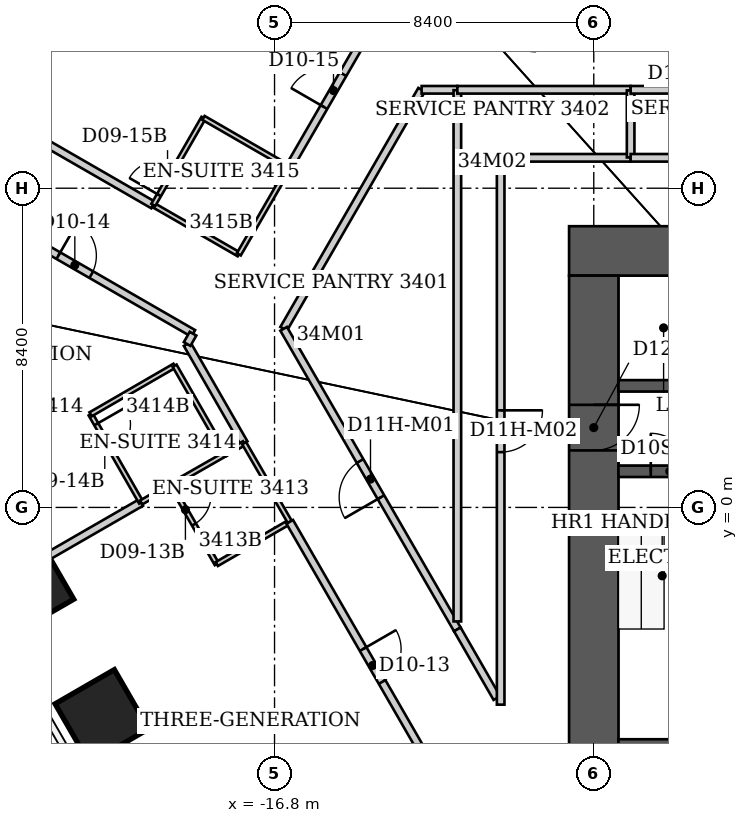
"""IFC4 building model, lengths in metres.
Left out: names, types, materials, properties, quantities, classifications, styles, units other than length and angle.
Written with IfcOpenShell. Run it as: python <this file> out.ifc"""

import sys

from ifc_helpers import new_model, si_unit, direction, frame, frame_2d, origin, origin_2d, place, context, subcontext, project, spatial, rectangle, extrude, element, fill, save


model = new_model("IFC4")
c1 = context("Model", 3, precision=1e-05, world=origin(), true_north=direction((0.0, 1.0)))
c2 = subcontext(c1, "Body", "Model", "MODEL_VIEW")
j1 = project(units=[si_unit("LENGTHUNIT", "METRE"), si_unit("PLANEANGLEUNIT", "RADIAN")], contexts=[c1])
p1 = place(None, origin())
s1 = spatial("IfcSite", under=j1, at=p1, CompositionType="ELEMENT")
p2 = place(p1, origin())
s2 = spatial("IfcBuilding", under=s1, at=p2, CompositionType="ELEMENT")
p3 = place(p2, frame((0.0, 0.0, 138.6)))
s3 = spatial("IfcBuildingStorey", under=s2, at=p3, CompositionType="ELEMENT", Elevation=138.6)
for number, where, z_axis, x_axis in (
    (1, (-21.344, -5.499, 0.0), (0.0, 0.0, 1.0), (-0.866, -0.5, 0.0)),
    (2, (-23.314, -2.087, 0.0), (0.0, 0.0, 1.0), (-0.866, -0.5, 0.0)),
):
    element("IfcColumn", number, at=place(p3, frame(where, z_axis=z_axis, x_axis=x_axis)), inside=s3, PredefinedType="COLUMN", context=c2, shape_type="SweptSolid", body=[
        extrude(rectangle(XDim=1.8, YDim=1.8, at=origin_2d()), origin(), (0.0, 0.0, 1.0), 3.8),
    ])
p4 = place(p3, frame((-9.05, 6.75, 0.0), z_axis=(0.0, 0.0, 1.0), x_axis=(1.0, 0.0, 0.0)))
e3 = element("IfcWall", 3, at=p4, inside=s3, PredefinedType="SHEAR", context=c2, shape_type="SweptSolid", body=[
    extrude(rectangle(XDim=18.1, YDim=1.3, at=frame_2d((9.05, 0.0))), origin(), (0.0, 0.0, 1.0), 3.8),
])
p5 = place(p3, frame((-8.4, -9.2, 0.0), z_axis=(0.0, 0.0, 1.0), x_axis=(0.0, 1.0, 0.0)))
e4 = element("IfcWall", 4, at=p5, inside=s3, PredefinedType="SHEAR", context=c2, shape_type="SweptSolid", body=[
    extrude(rectangle(XDim=15.3, YDim=1.3, at=frame_2d((7.65, 0.0))), origin(), (0.0, 0.0, 1.0), 3.8),
])
p6 = place(p5, frame((10.7, 0.0, 0.0)))
e5 = element("IfcOpeningElement", 5, at=p6, cuts=e4, PredefinedType="OPENING", context=c2, shape_type="SweptSolid", body=[
    extrude(rectangle(XDim=1.2, YDim=2.2, at=frame_2d((0.6, 1.1))), frame((0.0, 0.65, 0.0), z_axis=(0.0, -1.0, 0.0), x_axis=(1.0, 0.0, 0.0)), (0.0, 0.0, 1.0), 1.3),
])
p7 = place(p3, frame((-7.75, -6.5, 0.0), z_axis=(0.0, 0.0, 1.0), x_axis=(1.0, 0.0, 0.0)))
e6 = element("IfcWall", 6, at=p7, inside=s3, PredefinedType="SHEAR", context=c2, shape_type="SweptSolid", body=[
    extrude(rectangle(XDim=15.5, YDim=0.8, at=frame_2d((7.75, 0.0))), origin(), (0.0, 0.0, 1.0), 3.8),
])
p8 = place(p3, frame((-7.75, 0.95, 0.0), z_axis=(0.0, 0.0, 1.0), x_axis=(1.0, 0.0, 0.0)))
e7 = element("IfcWall", 7, at=p8, inside=s3, PredefinedType="SHEAR", context=c2, shape_type="SweptSolid", body=[
    extrude(rectangle(XDim=3.0, YDim=0.3, at=frame_2d((1.5, 0.0))), origin(), (0.0, 0.0, 1.0), 3.8),
])
p9 = place(p8, frame((0.85, 0.0, 0.0)))
e8 = element("IfcOpeningElement", 8, at=p9, cuts=e7, PredefinedType="OPENING", context=c2, shape_type="SweptSolid", body=[
    extrude(rectangle(XDim=1.0, YDim=2.2, at=frame_2d((0.5, 1.1))), frame((0.0, 0.15, 0.0), z_axis=(0.0, -1.0, 0.0), x_axis=(1.0, 0.0, 0.0)), (0.0, 0.0, 1.0), 0.3),
])
p10 = place(p3, frame((-7.75, 3.2, 0.0), z_axis=(0.0, 0.0, 1.0), x_axis=(1.0, 0.0, 0.0)))
e9 = element("IfcWall", 9, at=p10, inside=s3, PredefinedType="SHEAR", context=c2, shape_type="SweptSolid", body=[
    extrude(rectangle(XDim=15.5, YDim=0.3, at=frame_2d((7.75, 0.0))), origin(), (0.0, 0.0, 1.0), 3.8),
])
p11 = place(p10, frame((6.188, 0.0, 0.0)))
e10 = element("IfcOpeningElement", 10, at=p11, cuts=e9, PredefinedType="OPENING", context=c2, shape_type="SweptSolid", body=[
    extrude(rectangle(XDim=1.1, YDim=2.2, at=frame_2d((0.55, 1.1))), frame((0.0, 0.15, 0.0), z_axis=(0.0, -1.0, 0.0), x_axis=(1.0, 0.0, 0.0)), (0.0, 0.0, 1.0), 0.3),
])
p12 = place(p10, frame((10.075, 0.0, 0.0)))
e11 = element("IfcOpeningElement", 11, at=p12, cuts=e9, PredefinedType="OPENING", context=c2, shape_type="SweptSolid", body=[
    extrude(rectangle(XDim=1.1, YDim=2.2, at=frame_2d((0.55, 1.1))), frame((0.0, 0.15, 0.0), z_axis=(0.0, -1.0, 0.0), x_axis=(1.0, 0.0, 0.0)), (0.0, 0.0, 1.0), 0.3),
])
p13 = place(p10, frame((13.762, 0.0, 0.0)))
e12 = element("IfcOpeningElement", 12, at=p13, cuts=e9, PredefinedType="OPENING", context=c2, shape_type="SweptSolid", body=[
    extrude(rectangle(XDim=1.1, YDim=2.2, at=frame_2d((0.55, 1.1))), frame((0.0, 0.15, 0.0), z_axis=(0.0, -1.0, 0.0), x_axis=(1.0, 0.0, 0.0)), (0.0, 0.0, 1.0), 0.3),
])
p14 = place(p3, frame((-25.17, 8.17, 0.0), z_axis=(0.0, 0.0, 1.0), x_axis=(0.866448885678, -0.499265789443, 0.0)))
e13 = element("IfcWall", 13, at=p14, inside=s3, PredefinedType="PARTITIONING", context=c2, shape_type="SweptSolid", body=[
    extrude(rectangle(XDim=7.19, YDim=0.2, at=frame_2d((3.595, 0.0))), origin(), (0.0, 0.0, 1.0), 3.64),
])
p15 = place(p14, frame((3.095, 0.0, 0.0)))
e14 = element("IfcOpeningElement", 14, at=p15, cuts=e13, PredefinedType="OPENING", context=c2, shape_type="SweptSolid", body=[
    extrude(rectangle(XDim=1.0, YDim=2.13, at=frame_2d((0.5, 1.065))), frame((0.0, 0.1, 0.0), z_axis=(0.0, -1.0, 0.0), x_axis=(1.0, 0.0, 0.0)), (0.0, 0.0, 1.0), 0.2),
])
p16 = place(p3, frame((-24.506, -2.29, 0.0), z_axis=(0.0, 0.0, 1.0), x_axis=(0.86626361228, 0.499587183622, 0.0)))
e15 = element("IfcWall", 15, at=p16, inside=s3, PredefinedType="PARTITIONING", context=c2, shape_type="SweptSolid", body=[
    extrude(rectangle(XDim=4.844, YDim=0.2, at=frame_2d((2.422, 0.0))), origin(), (0.0, 0.0, 1.0), 3.64),
])
p17 = place(p3, frame((-23.97, 10.25, 0.0), z_axis=(0.0, 0.0, 1.0), x_axis=(0.86645101645, -0.499262091585, 0.0)))
e16 = element("IfcWall", 16, at=p17, inside=s3, PredefinedType="PARTITIONING", context=c2, shape_type="SweptSolid", body=[
    extrude(rectangle(XDim=4.592, YDim=0.2, at=frame_2d((2.296, 0.0))), origin(), (0.0, 0.0, 1.0), 3.64),
])
p18 = place(p3, frame((-21.64, 2.45, 0.0), z_axis=(0.0, 0.0, 1.0), x_axis=(0.497288831399, -0.867585049529, 0.0)))
e17 = element("IfcWall", 17, at=p18, inside=s3, PredefinedType="PARTITIONING", context=c2, shape_type="SweptSolid", body=[
    extrude(rectangle(XDim=2.674, YDim=0.12, at=frame_2d((1.337, 0.0))), origin(), (0.0, 0.0, 1.0), 3.64),
])
p19 = place(p18, frame((0.3, 0.0, 0.0)))
e18 = element("IfcOpeningElement", 18, at=p19, cuts=e17, PredefinedType="OPENING", context=c2, shape_type="SweptSolid", body=[
    extrude(rectangle(XDim=0.9, YDim=2.03, at=frame_2d((0.45, 1.015))), frame((0.0, 0.06, 0.0), z_axis=(0.0, -1.0, 0.0), x_axis=(1.0, 0.0, 0.0)), (0.0, 0.0, 1.0), 0.12),
])
p20 = place(p3, frame((-20.31, 0.13, 0.0), z_axis=(0.0, 0.0, 1.0), x_axis=(0.864088651014, 0.503339649926, 0.0)))
e19 = element("IfcWall", 19, at=p20, inside=s3, PredefinedType="PARTITIONING", context=c2, shape_type="SweptSolid", body=[
    extrude(rectangle(XDim=0.914, YDim=0.12, at=frame_2d((0.457, 0.0))), origin(), (0.0, 0.0, 1.0), 3.64),
])
p21 = place(p3, frame((-19.991, 7.958, 0.0), z_axis=(0.0, 0.0, 1.0), x_axis=(0.866404475641, -0.499342852747, 0.0)))
e20 = element("IfcWall", 20, at=p21, inside=s3, PredefinedType="PARTITIONING", context=c2, shape_type="SweptSolid", body=[
    extrude(rectangle(XDim=2.599, YDim=0.12, at=frame_2d((1.299, 0.0))), origin(), (0.0, 0.0, 1.0), 3.64),
])
p22 = place(p3, frame((-19.52, 0.59, 0.0), z_axis=(0.0, 0.0, 1.0), x_axis=(0.499693115345, -0.866202511239, 0.0)))
e21 = element("IfcWall", 21, at=p22, inside=s3, PredefinedType="PARTITIONING", context=c2, shape_type="SweptSolid", body=[
    extrude(rectangle(XDim=2.401, YDim=0.12, at=frame_2d((1.201, 0.0))), origin(), (0.0, 0.0, 1.0), 3.64),
])
p23 = place(p22, frame((0.3, 0.0, 0.0)))
e22 = element("IfcOpeningElement", 22, at=p23, cuts=e21, PredefinedType="OPENING", context=c2, shape_type="SweptSolid", body=[
    extrude(rectangle(XDim=0.9, YDim=2.03, at=frame_2d((0.45, 1.015))), frame((0.0, 0.06, 0.0), z_axis=(0.0, -1.0, 0.0), x_axis=(1.0, 0.0, 0.0)), (0.0, 0.0, 1.0), 0.12),
])
p24 = place(p3, frame((-19.52, 0.59, 0.0), z_axis=(0.0, 0.0, 1.0), x_axis=(0.868013991935, 0.496539736381, 0.0)))
e23 = element("IfcWall", 23, at=p24, inside=s3, PredefinedType="PARTITIONING", context=c2, shape_type="SweptSolid", body=[
    extrude(rectangle(XDim=1.64, YDim=0.12, at=frame_2d((0.82, 0.0))), origin(), (0.0, 0.0, 1.0), 3.64),
])
p25 = place(p3, frame((-19.43, 3.73, 0.0), z_axis=(0.0, 0.0, 1.0), x_axis=(-0.865328095335, -0.50120583339, 0.0)))
e24 = element("IfcWall", 24, at=p25, inside=s3, PredefinedType="PARTITIONING", context=c2, shape_type="SweptSolid", body=[
    extrude(rectangle(XDim=2.554, YDim=0.12, at=frame_2d((1.277, 0.0))), origin(), (0.0, 0.0, 1.0), 3.64),
])
p26 = place(p3, frame((-19.1, 4.3, 0.0), z_axis=(0.0, 0.0, 1.0), x_axis=(0.498268459914, -0.867022803538, 0.0)))
e25 = element("IfcWall", 25, at=p26, inside=s3, PredefinedType="PARTITIONING", context=c2, shape_type="SweptSolid", body=[
    extrude(rectangle(XDim=3.01, YDim=0.2, at=frame_2d((1.505, 0.0))), origin(), (0.0, 0.0, 1.0), 3.64),
])
p27 = place(p3, frame((-18.945, 4.571, 0.0), z_axis=(0.0, 0.0, 1.0), x_axis=(-0.496223092577, -0.868195048588, 0.0)))
e26 = element("IfcWall", 26, at=p27, inside=s3, PredefinedType="PARTITIONING", context=c2, shape_type="SweptSolid", body=[
    extrude(rectangle(XDim=0.312, YDim=0.2, at=frame_2d((0.156, 0.0))), origin(), (0.0, 0.0, 1.0), 3.64),
])
p28 = place(p3, frame((-18.67, 10.25, 0.0), z_axis=(0.0, 0.0, 1.0), x_axis=(-0.499407914056, -0.866366975004, 0.0)))
e27 = element("IfcWall", 27, at=p28, inside=s3, PredefinedType="PARTITIONING", context=c2, shape_type="SweptSolid", body=[
    extrude(rectangle(XDim=2.643, YDim=0.12, at=frame_2d((1.322, 0.0))), origin(), (0.0, 0.0, 1.0), 3.64),
])
p29 = place(p28, frame((1.443, 0.0, 0.0)))
e28 = element("IfcOpeningElement", 28, at=p29, cuts=e27, PredefinedType="OPENING", context=c2, shape_type="SweptSolid", body=[
    extrude(rectangle(XDim=0.9, YDim=2.03, at=frame_2d((0.45, 1.015))), frame((0.0, 0.06, 0.0), z_axis=(0.0, -1.0, 0.0), x_axis=(1.0, 0.0, 0.0)), (0.0, 0.0, 1.0), 0.12),
])
p30 = place(p3, frame((-18.32, -1.49, 0.0), z_axis=(0.0, 0.0, 1.0), x_axis=(0.865732595383, 0.500506816428, 0.0)))
e29 = element("IfcWall", 29, at=p30, inside=s3, PredefinedType="PARTITIONING", context=c2, shape_type="SweptSolid", body=[
    extrude(rectangle(XDim=2.218, YDim=0.12, at=frame_2d((1.109, 0.0))), origin(), (0.0, 0.0, 1.0), 3.023),
])
p31 = place(p3, frame((-18.1, 1.41, 0.0), z_axis=(0.0, 0.0, 1.0), x_axis=(-0.497288831399, 0.867585049529, 0.0)))
e30 = element("IfcWall", 30, at=p31, inside=s3, PredefinedType="PARTITIONING", context=c2, shape_type="SweptSolid", body=[
    extrude(rectangle(XDim=2.674, YDim=0.12, at=frame_2d((1.337, 0.0))), origin(), (0.0, 0.0, 1.0), 3.64),
])
p32 = place(p3, frame((-18.097, 1.404, 0.0), z_axis=(0.0, 0.0, 1.0), x_axis=(0.866823419736, 0.498615241441, 0.0)))
e31 = element("IfcWall", 31, at=p32, inside=s3, PredefinedType="PARTITIONING", context=c2, shape_type="SweptSolid", body=[
    extrude(rectangle(XDim=0.573, YDim=0.12, at=frame_2d((0.286, 0.0))), origin(), (0.0, 0.0, 1.0), 3.64),
])
p33 = place(p3, frame((-17.74, 6.66, 0.0), z_axis=(0.0, 0.0, 1.0), x_axis=(0.500519174073, 0.865725450929, 0.0)))
e32 = element("IfcWall", 32, at=p33, inside=s3, PredefinedType="PARTITIONING", context=c2, shape_type="SweptSolid", body=[
    extrude(rectangle(XDim=2.643, YDim=0.12, at=frame_2d((1.322, 0.0))), origin(), (0.0, 0.0, 1.0), 3.64),
])
p34 = place(p3, frame((-17.6, 1.69, 0.0), z_axis=(0.0, 0.0, 1.0), x_axis=(0.501623408317, -0.865086097581, 0.0)))
e33 = element("IfcWall", 33, at=p34, inside=s3, PredefinedType="PARTITIONING", context=c2, shape_type="SweptSolid", body=[
    extrude(rectangle(XDim=2.393, YDim=0.12, at=frame_2d((1.196, 0.0))), origin(), (0.0, 0.0, 1.0), 3.64),
])
p35 = place(p3, frame((-16.56, 4.7, 0.0), z_axis=(0.0, 0.0, 1.0), x_axis=(0.4998524389, 0.866110581465, 0.0)))
e34 = element("IfcWall", 34, at=p35, inside=s3, PredefinedType="PARTITIONING", context=c2, shape_type="SweptSolid", body=[
    extrude(rectangle(XDim=7.262, YDim=0.2, at=frame_2d((3.631, 0.0))), origin(), (0.0, 0.0, 1.0), 3.64),
])
p36 = place(p3, frame((-16.42, 8.95, 0.0), z_axis=(0.0, 0.0, 1.0), x_axis=(-0.865856933682, 0.500291685314, 0.0)))
e35 = element("IfcWall", 35, at=p36, inside=s3, PredefinedType="PARTITIONING", context=c2, shape_type="SweptSolid", body=[
    extrude(rectangle(XDim=2.599, YDim=0.12, at=frame_2d((1.299, 0.0))), origin(), (0.0, 0.0, 1.0), 3.64),
])
p37 = place(p3, frame((-16.417, 8.948, 0.0), z_axis=(0.0, 0.0, 1.0), x_axis=(0.500547653499, 0.865708984923, 0.0)))
e36 = element("IfcWall", 36, at=p37, inside=s3, PredefinedType="PARTITIONING", context=c2, shape_type="SweptSolid", body=[
    extrude(rectangle(XDim=4.669, YDim=0.2, at=frame_2d((2.334, 0.0))), origin(), (0.0, 0.0, 1.0), 3.64),
])
p38 = place(p37, frame((1.834, 0.0, 0.0)))
e37 = element("IfcOpeningElement", 37, at=p38, cuts=e36, PredefinedType="OPENING", context=c2, shape_type="SweptSolid", body=[
    extrude(rectangle(XDim=1.0, YDim=2.13, at=frame_2d((0.5, 1.065))), frame((0.0, 0.1, 0.0), z_axis=(0.0, -1.0, 0.0), x_axis=(1.0, 0.0, 0.0)), (0.0, 0.0, 1.0), 0.2),
])
p39 = place(p3, frame((-16.4, -0.38, 0.0), z_axis=(0.0, 0.0, 1.0), x_axis=(0.499575523811, -0.866270336563, 0.0)))
e38 = element("IfcWall", 38, at=p39, inside=s3, PredefinedType="PARTITIONING", context=c2, shape_type="SweptSolid", body=[
    extrude(rectangle(XDim=8.727, YDim=0.2, at=frame_2d((4.364, 0.0))), origin(), (0.0, 0.0, 1.0), 3.64),
])
p40 = place(p39, frame((3.864, 0.0, 0.0)))
e39 = element("IfcOpeningElement", 39, at=p40, cuts=e38, PredefinedType="OPENING", context=c2, shape_type="SweptSolid", body=[
    extrude(rectangle(XDim=1.0, YDim=2.13, at=frame_2d((0.5, 1.065))), frame((0.0, 0.1, 0.0), z_axis=(0.0, -1.0, 0.0), x_axis=(1.0, 0.0, 0.0)), (0.0, 0.0, 1.0), 0.2),
])
p41 = place(p3, frame((-12.93, 10.99, 0.0), z_axis=(0.0, 0.0, 1.0), x_axis=(1.0, 0.0, 0.0)))
e40 = element("IfcWall", 40, at=p41, inside=s3, PredefinedType="PARTITIONING", context=c2, shape_type="SweptSolid", body=[
    extrude(rectangle(XDim=0.94, YDim=0.2, at=frame_2d((0.47, 0.0))), origin(), (0.0, 0.0, 1.0), 3.64),
])
p42 = place(p3, frame((-11.99, -3.21, 0.0), z_axis=(0.0, 0.0, 1.0), x_axis=(-0.500269138002, 0.865869961116, 0.0)))
e41 = element("IfcWall", 41, at=p42, inside=s3, PredefinedType="PARTITIONING", context=c2, shape_type="SweptSolid", body=[
    extrude(rectangle(XDim=9.135, YDim=0.2, at=frame_2d((4.568, 0.0))), origin(), (0.0, 0.0, 1.0), 3.64),
])
p43 = place(p42, frame((4.018, 0.0, 0.0)))
e42 = element("IfcOpeningElement", 42, at=p43, cuts=e41, PredefinedType="OPENING", context=c2, shape_type="SweptSolid", body=[
    extrude(rectangle(XDim=1.1, YDim=2.2, at=frame_2d((0.55, 1.1))), frame((0.0, 0.1, 0.0), z_axis=(0.0, -1.0, 0.0), x_axis=(1.0, 0.0, 0.0)), (0.0, 0.0, 1.0), 0.2),
])
p44 = place(p3, frame((-11.99, 10.98, 0.0), z_axis=(0.0, 0.0, 1.0), x_axis=(0.0, -1.0, 0.0)))
e43 = element("IfcWall", 43, at=p44, inside=s3, PredefinedType="PARTITIONING", context=c2, shape_type="SweptSolid", body=[
    extrude(rectangle(XDim=13.98, YDim=0.2, at=frame_2d((6.99, 0.0))), origin(), (0.0, 0.0, 1.0), 3.64),
])
p45 = place(p3, frame((-11.99, 10.99, 0.0), z_axis=(0.0, 0.0, 1.0), x_axis=(1.0, 0.0, 0.0)))
e44 = element("IfcWall", 44, at=p45, inside=s3, PredefinedType="PARTITIONING", context=c2, shape_type="SweptSolid", body=[
    extrude(rectangle(XDim=4.56, YDim=0.2, at=frame_2d((2.28, 0.0))), origin(), (0.0, 0.0, 1.0), 3.64),
])
p46 = place(p3, frame((-10.95, -5.017, 0.0), z_axis=(0.0, 0.0, 1.0), x_axis=(-0.498999092416, 0.866602507363, 0.0)))
e45 = element("IfcWall", 45, at=p46, inside=s3, PredefinedType="PARTITIONING", context=c2, shape_type="SweptSolid", body=[
    extrude(rectangle(XDim=2.085, YDim=0.2, at=frame_2d((1.042, 0.0))), origin(), (0.0, 0.0, 1.0), 3.64),
])
p47 = place(p3, frame((-10.85, 9.2, 0.0), z_axis=(0.0, 0.0, 1.0), x_axis=(0.0, -1.0, 0.0)))
e46 = element("IfcWall", 46, at=p47, inside=s3, PredefinedType="PARTITIONING", context=c2, shape_type="SweptSolid", body=[
    extrude(rectangle(XDim=14.39, YDim=0.2, at=frame_2d((7.195, 0.0))), origin(), (0.0, 0.0, 1.0), 3.64),
])
p48 = place(p47, frame((6.645, 0.0, 0.0)))
e47 = element("IfcOpeningElement", 47, at=p48, cuts=e46, PredefinedType="OPENING", context=c2, shape_type="SweptSolid", body=[
    extrude(rectangle(XDim=1.1, YDim=2.2, at=frame_2d((0.55, 1.1))), frame((0.0, 0.1, 0.0), z_axis=(0.0, -1.0, 0.0), x_axis=(1.0, 0.0, 0.0)), (0.0, 0.0, 1.0), 0.2),
])
p49 = place(p3, frame((-7.43, 9.2, 0.0), z_axis=(0.0, 0.0, 1.0), x_axis=(-1.0, 0.0, 0.0)))
e48 = element("IfcWall", 48, at=p49, inside=s3, PredefinedType="PARTITIONING", context=c2, shape_type="SweptSolid", body=[
    extrude(rectangle(XDim=3.41, YDim=0.2, at=frame_2d((1.705, 0.0))), origin(), (0.0, 0.0, 1.0), 3.64),
])
p50 = place(p3, frame((-7.43, 10.975, 0.0), z_axis=(0.0, 0.0, 1.0), x_axis=(0.0, -1.0, 0.0)))
e49 = element("IfcWall", 49, at=p50, inside=s3, PredefinedType="PARTITIONING", context=c2, shape_type="SweptSolid", body=[
    extrude(rectangle(XDim=1.765, YDim=0.2, at=frame_2d((0.883, 0.0))), origin(), (0.0, 0.0, 1.0), 3.64),
])
p51 = place(p3, frame((-7.43, 10.99, 0.0), z_axis=(0.0, 0.0, 1.0), x_axis=(1.0, 0.0, 0.0)))
e50 = element("IfcWall", 50, at=p51, inside=s3, PredefinedType="PARTITIONING", context=c2, shape_type="SweptSolid", body=[
    extrude(rectangle(XDim=4.57, YDim=0.2, at=frame_2d((2.285, 0.0))), origin(), (0.0, 0.0, 1.0), 3.64),
])
p52 = place(p51, frame((1.735, 0.0, 0.0)))
e51 = element("IfcOpeningElement", 51, at=p52, cuts=e50, PredefinedType="OPENING", context=c2, shape_type="SweptSolid", body=[
    extrude(rectangle(XDim=1.1, YDim=2.2, at=frame_2d((0.55, 1.1))), frame((0.0, 0.1, 0.0), z_axis=(0.0, -1.0, 0.0), x_axis=(1.0, 0.0, 0.0)), (0.0, 0.0, 1.0), 0.2),
])
p53 = place(p3, frame((-2.86, 9.2, 0.0), z_axis=(0.0, 0.0, 1.0), x_axis=(-1.0, 0.0, 0.0)))
e52 = element("IfcWall", 52, at=p53, inside=s3, PredefinedType="PARTITIONING", context=c2, shape_type="SweptSolid", body=[
    extrude(rectangle(XDim=4.57, YDim=0.2, at=frame_2d((2.285, 0.0))), origin(), (0.0, 0.0, 1.0), 3.64),
])
p54 = place(p40, origin())
e53 = element("IfcDoor", 53, at=p54, inside=s3, OperationType="SINGLE_SWING_LEFT", PredefinedType="DOOR", context=c2, shape_type="SweptSolid", body=[
    extrude(rectangle(XDim=1.0, YDim=2.13, at=frame_2d((0.5, 1.065))), frame((0.0, 0.025, 0.0), z_axis=(0.0, -1.0, 0.0), x_axis=(1.0, 0.0, 0.0)), (0.0, 0.0, 1.0), 0.05),
])
fill(e39, e53)
p55 = place(p23, origin())
e54 = element("IfcDoor", 54, at=p55, inside=s3, OperationType="SINGLE_SWING_LEFT", PredefinedType="DOOR", context=c2, shape_type="SweptSolid", body=[
    extrude(rectangle(XDim=0.9, YDim=2.03, at=frame_2d((0.45, 1.015))), frame((0.0, 0.025, 0.0), z_axis=(0.0, -1.0, 0.0), x_axis=(1.0, 0.0, 0.0)), (0.0, 0.0, 1.0), 0.05),
])
fill(e22, e54)
p56 = place(p15, origin())
e55 = element("IfcDoor", 55, at=p56, inside=s3, OperationType="SINGLE_SWING_LEFT", PredefinedType="DOOR", context=c2, shape_type="SweptSolid", body=[
    extrude(rectangle(XDim=1.0, YDim=2.13, at=frame_2d((0.5, 1.065))), frame((0.0, 0.025, 0.0), z_axis=(0.0, -1.0, 0.0), x_axis=(1.0, 0.0, 0.0)), (0.0, 0.0, 1.0), 0.05),
])
fill(e14, e55)
p57 = place(p19, origin())
e56 = element("IfcDoor", 56, at=p57, inside=s3, OperationType="SINGLE_SWING_LEFT", PredefinedType="DOOR", context=c2, shape_type="SweptSolid", body=[
    extrude(rectangle(XDim=0.9, YDim=2.03, at=frame_2d((0.45, 1.015))), frame((0.0, 0.025, 0.0), z_axis=(0.0, -1.0, 0.0), x_axis=(1.0, 0.0, 0.0)), (0.0, 0.0, 1.0), 0.05),
])
fill(e18, e56)
p58 = place(p38, origin())
e57 = element("IfcDoor", 57, at=p58, inside=s3, OperationType="SINGLE_SWING_LEFT", PredefinedType="DOOR", context=c2, shape_type="SweptSolid", body=[
    extrude(rectangle(XDim=1.0, YDim=2.13, at=frame_2d((0.5, 1.065))), frame((0.0, 0.025, 0.0), z_axis=(0.0, -1.0, 0.0), x_axis=(1.0, 0.0, 0.0)), (0.0, 0.0, 1.0), 0.05),
])
fill(e37, e57)
p59 = place(p29, origin())
e58 = element("IfcDoor", 58, at=p59, inside=s3, OperationType="SINGLE_SWING_RIGHT", PredefinedType="DOOR", context=c2, shape_type="SweptSolid", body=[
    extrude(rectangle(XDim=0.9, YDim=2.03, at=frame_2d((0.45, 1.015))), frame((0.0, 0.025, 0.0), z_axis=(0.0, -1.0, 0.0), x_axis=(1.0, 0.0, 0.0)), (0.0, 0.0, 1.0), 0.05),
])
fill(e28, e58)
p60 = place(p43, origin())
e59 = element("IfcDoor", 59, at=p60, inside=s3, OperationType="SINGLE_SWING_LEFT", PredefinedType="DOOR", context=c2, shape_type="SweptSolid", body=[
    extrude(rectangle(XDim=1.1, YDim=2.2, at=frame_2d((0.55, 1.1))), frame((0.0, 0.025, 0.0), z_axis=(0.0, -1.0, 0.0), x_axis=(1.0, 0.0, 0.0)), (0.0, 0.0, 1.0), 0.05),
])
fill(e42, e59)
p61 = place(p48, origin())
e60 = element("IfcDoor", 60, at=p61, inside=s3, OperationType="SINGLE_SWING_LEFT", PredefinedType="DOOR", context=c2, shape_type="SweptSolid", body=[
    extrude(rectangle(XDim=1.1, YDim=2.2, at=frame_2d((0.55, 1.1))), frame((0.0, 0.025, 0.0), z_axis=(0.0, -1.0, 0.0), x_axis=(1.0, 0.0, 0.0)), (0.0, 0.0, 1.0), 0.05),
])
fill(e47, e60)
p62 = place(p9, origin())
e61 = element("IfcDoor", 61, at=p62, inside=s3, OperationType="SINGLE_SWING_LEFT", PredefinedType="DOOR", context=c2, shape_type="SweptSolid", body=[
    extrude(rectangle(XDim=1.0, YDim=2.2, at=frame_2d((0.5, 1.1))), frame((0.0, 0.025, 0.0), z_axis=(0.0, -1.0, 0.0), x_axis=(1.0, 0.0, 0.0)), (0.0, 0.0, 1.0), 0.05),
])
fill(e8, e61)
p63 = place(p6, origin())
e62 = element("IfcDoor", 62, at=p63, inside=s3, OperationType="SINGLE_SWING_RIGHT", PredefinedType="DOOR", context=c2, shape_type="SweptSolid", body=[
    extrude(rectangle(XDim=1.2, YDim=2.2, at=frame_2d((0.6, 1.1))), frame((0.0, 0.025, 0.0), z_axis=(0.0, -1.0, 0.0), x_axis=(1.0, 0.0, 0.0)), (0.0, 0.0, 1.0), 0.05),
])
fill(e5, e62)
save(model, sys.argv[1])
